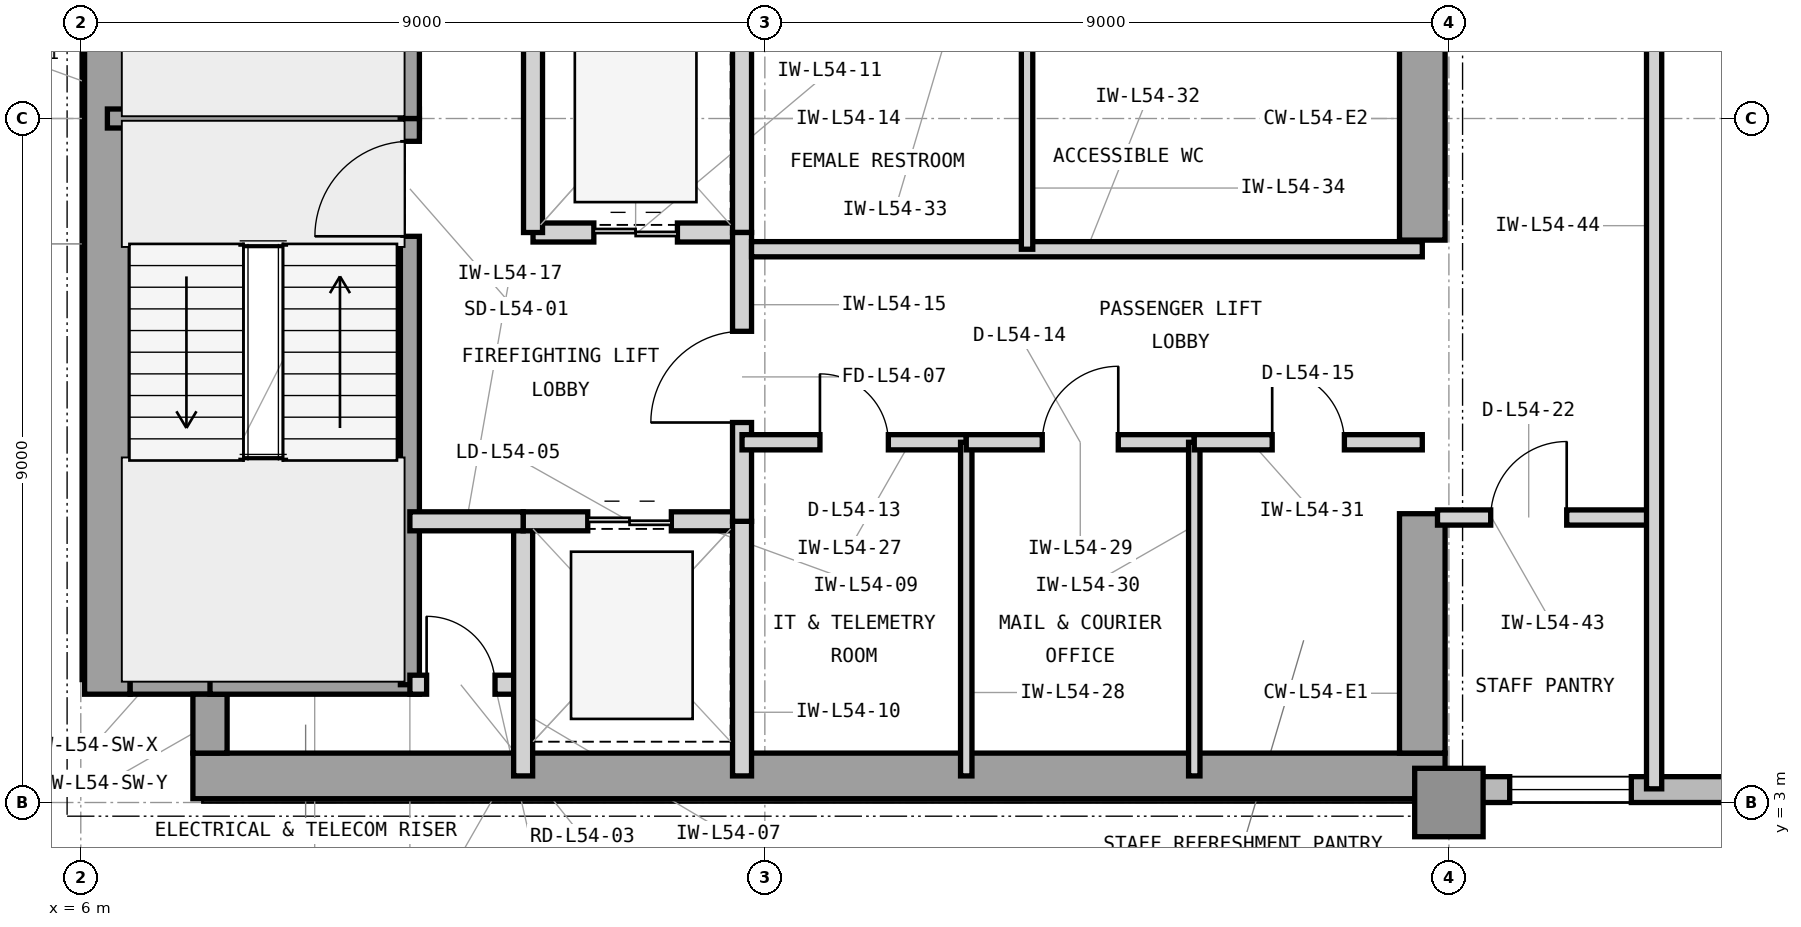
"""IFC4 building model, lengths in metres.
Left out: names, types, materials, properties, quantities, classifications, styles, units other than length and angle.
Written with IfcOpenShell. Run it as: python <this file> out.ifc"""

import sys

from ifc_helpers import new_model, si_unit, direction, frame, frame_2d, origin, origin_2d, place, context, subcontext, project, spatial, rectangle, extrude, element, fill, save


model = new_model("IFC4")
c1 = context("Model", 3, precision=1e-05, world=origin(), true_north=direction((0.0, 1.0)))
c2 = subcontext(c1, "Body", "Model", "MODEL_VIEW")
j1 = project(units=[si_unit("LENGTHUNIT", "METRE"), si_unit("PLANEANGLEUNIT", "RADIAN")], contexts=[c1])
p1 = place(None, origin())
s1 = spatial("IfcSite", under=j1, at=p1, CompositionType="ELEMENT")
p2 = place(p1, origin())
s2 = spatial("IfcBuilding", under=s1, at=p2, CompositionType="ELEMENT")
p3 = place(p2, frame((0.0, 0.0, 222.9)))
s3 = spatial("IfcBuildingStorey", under=s2, at=p3, CompositionType="ELEMENT", Elevation=222.9)
p4 = place(p3, frame((7.475, 3.35, 0.0), z_axis=(0.0, 0.0, 1.0), x_axis=(1.0, 0.0, 0.0)))
e1 = element("IfcWall", 1, at=p4, inside=s3, PredefinedType="SHEAR", context=c2, shape_type="SweptSolid", body=[
    extrude(rectangle(XDim=16.475, YDim=0.6, at=frame_2d((8.237, 0.0))), origin(), (0.0, 0.0, 1.0), 3.9),
])
p5 = place(p3, frame((6.35, 4.425, 0.0), z_axis=(0.0, 0.0, 1.0), x_axis=(0.0, 1.0, 0.0)))
e2 = element("IfcWall", 2, at=p5, inside=s3, PredefinedType="SHEAR", context=c2, shape_type="SweptSolid", body=[
    extrude(rectangle(XDim=15.15, YDim=0.6, at=frame_2d((7.575, 0.0))), origin(), (0.0, 0.0, 1.0), 3.9),
])
p6 = place(p3, frame((23.65, 3.65, 0.0), z_axis=(0.0, 0.0, 1.0), x_axis=(0.0, 1.0, 0.0)))
e3 = element("IfcWall", 3, at=p6, inside=s3, PredefinedType="SHEAR", context=c2, shape_type="SweptSolid", body=[
    extrude(rectangle(XDim=3.15, YDim=0.6, at=frame_2d((1.575, 0.0))), origin(), (0.0, 0.0, 1.0), 3.9),
])
p7 = place(p3, frame((23.65, 10.4, 0.0), z_axis=(0.0, 0.0, 1.0), x_axis=(0.0, 1.0, 0.0)))
e4 = element("IfcWall", 4, at=p7, inside=s3, PredefinedType="SHEAR", context=c2, shape_type="SweptSolid", body=[
    extrude(rectangle(XDim=3.2, YDim=0.6, at=frame_2d((1.6, 0.0))), origin(), (0.0, 0.0, 1.0), 3.9),
])
p8 = place(p3, frame((6.65, 4.65, 0.0), z_axis=(0.0, 0.0, 1.0), x_axis=(1.0, 0.0, 0.0)))
e5 = element("IfcWall", 5, at=p8, inside=s3, PredefinedType="SHEAR", context=c2, shape_type="SweptSolid", body=[
    extrude(rectangle(XDim=1.275, YDim=0.45, at=frame_2d((0.638, 0.0))), origin(), (0.0, 0.0, 1.0), 3.9),
])
p9 = place(p3, frame((7.7, 3.65, 0.0), z_axis=(0.0, 0.0, 1.0), x_axis=(0.0, 1.0, 0.0)))
e6 = element("IfcWall", 6, at=p9, inside=s3, PredefinedType="SHEAR", context=c2, shape_type="SweptSolid", body=[
    extrude(rectangle(XDim=0.775, YDim=0.45, at=frame_2d((0.388, 0.0))), origin(), (0.0, 0.0, 1.0), 3.9),
])
p10 = place(p3, frame((24.0, 3.0, 0.0), z_axis=(0.0, 0.0, 1.0), x_axis=(1.0, 0.0, 0.0)))
e7 = element("IfcColumn", 7, at=p10, inside=s3, PredefinedType="COLUMN", context=c2, shape_type="SweptSolid", body=[
    extrude(rectangle(XDim=0.9, YDim=0.9, at=origin_2d()), origin(), (0.0, 0.0, 1.0), 3.9),
])
p11 = place(p3, frame((23.9, 3.17, 0.0), z_axis=(0.0, 0.0, 1.0), x_axis=(1.0, 0.0, 0.0)))
e8 = element("IfcWall", 8, at=p11, inside=s3, PredefinedType="STANDARD", context=c2, shape_type="SweptSolid", body=[
    extrude(rectangle(XDim=31.5, YDim=0.34, at=frame_2d((15.75, 0.0))), origin(), (0.0, 0.0, 1.0), 3.62),
])
p12 = place(p11, frame((5.6, 0.0, 0.9)))
e9 = element("IfcOpeningElement", 9, at=p12, cuts=e8, PredefinedType="OPENING", context=c2, shape_type="SweptSolid", body=[
    extrude(rectangle(XDim=2.3, YDim=2.2, at=frame_2d((1.15, 1.1))), frame((0.0, 0.18, 0.0), z_axis=(0.0, -1.0, 0.0), x_axis=(1.0, 0.0, 0.0)), (0.0, 0.0, 1.0), 0.36),
])
p13 = place(p11, frame((14.6, 0.0, 0.9)))
e10 = element("IfcOpeningElement", 10, at=p13, cuts=e8, PredefinedType="OPENING", context=c2, shape_type="SweptSolid", body=[
    extrude(rectangle(XDim=2.3, YDim=2.2, at=frame_2d((1.15, 1.1))), frame((0.0, 0.18, 0.0), z_axis=(0.0, -1.0, 0.0), x_axis=(1.0, 0.0, 0.0)), (0.0, 0.0, 1.0), 0.36),
])
p14 = place(p11, frame((0.9, 0.0, 0.9)))
e11 = element("IfcOpeningElement", 11, at=p14, cuts=e8, PredefinedType="OPENING", context=c2, shape_type="SweptSolid", body=[
    extrude(rectangle(XDim=1.6, YDim=2.2, at=frame_2d((0.8, 1.1))), frame((0.0, 0.18, 0.0), z_axis=(0.0, -1.0, 0.0), x_axis=(1.0, 0.0, 0.0)), (0.0, 0.0, 1.0), 0.36),
])
p15 = place(p11, frame((20.825, 0.0, 0.9)))
e12 = element("IfcOpeningElement", 12, at=p15, cuts=e8, PredefinedType="OPENING", context=c2, shape_type="SweptSolid", body=[
    extrude(rectangle(XDim=2.3, YDim=2.2, at=frame_2d((1.15, 1.1))), frame((0.0, 0.18, 0.0), z_axis=(0.0, -1.0, 0.0), x_axis=(1.0, 0.0, 0.0)), (0.0, 0.0, 1.0), 0.36),
])
p16 = place(p3, frame((6.35, 12.0, 0.0), z_axis=(0.0, 0.0, 1.0), x_axis=(1.0, 0.0, 0.0)))
e13 = element("IfcWall", 13, at=p16, inside=s3, PredefinedType="SHEAR", context=c2, shape_type="SweptSolid", body=[
    extrude(rectangle(XDim=4.105, YDim=0.25, at=frame_2d((2.052, 0.0))), origin(), (0.0, 0.0, 1.0), 3.9),
])
p17 = place(p3, frame((7.7, 4.55, 0.0), z_axis=(0.0, 0.0, 1.0), x_axis=(1.0, 0.0, 0.0)))
e14 = element("IfcWall", 14, at=p17, inside=s3, PredefinedType="SHEAR", context=c2, shape_type="SweptSolid", body=[
    extrude(rectangle(XDim=2.755, YDim=0.25, at=frame_2d((1.377, 0.0))), origin(), (0.0, 0.0, 1.0), 3.9),
])
p18 = place(p3, frame((10.33, 4.55, 0.0), z_axis=(0.0, 0.0, 1.0), x_axis=(0.0, 1.0, 0.0)))
e15 = element("IfcWall", 15, at=p18, inside=s3, PredefinedType="SHEAR", context=c2, shape_type="SweptSolid", body=[
    extrude(rectangle(XDim=7.45, YDim=0.25, at=frame_2d((3.725, 0.0))), origin(), (0.0, 0.0, 1.0), 3.9),
])
p19 = place(p18, frame((5.9, 0.0, 0.0)))
e16 = element("IfcOpeningElement", 16, at=p19, cuts=e15, PredefinedType="OPENING", context=c2, shape_type="SweptSolid", body=[
    extrude(rectangle(XDim=1.25, YDim=2.2, at=frame_2d((0.625, 1.1))), frame((0.0, 0.135, 0.0), z_axis=(0.0, -1.0, 0.0), x_axis=(1.0, 0.0, 0.0)), (0.0, 0.0, 1.0), 0.27),
])
p20 = place(p3, frame((10.33, 12.0, 0.0), z_axis=(0.0, 0.0, 1.0), x_axis=(0.0, 1.0, 0.0)))
e17 = element("IfcWall", 17, at=p20, inside=s3, PredefinedType="SHEAR", context=c2, shape_type="SweptSolid", body=[
    extrude(rectangle(XDim=7.45, YDim=0.25, at=frame_2d((3.725, 0.0))), origin(), (0.0, 0.0, 1.0), 3.9),
])
p21 = place(p20, frame((5.85, 0.0, 0.0)))
e18 = element("IfcOpeningElement", 18, at=p21, cuts=e17, PredefinedType="OPENING", context=c2, shape_type="SweptSolid", body=[
    extrude(rectangle(XDim=1.25, YDim=2.2, at=frame_2d((0.625, 1.1))), frame((0.0, 0.135, 0.0), z_axis=(0.0, -1.0, 0.0), x_axis=(1.0, 0.0, 0.0)), (0.0, 0.0, 1.0), 0.27),
])
p22 = place(p3, frame((10.33, 4.55, 0.0), z_axis=(0.0, 0.0, 1.0), x_axis=(1.0, 0.0, 0.0)))
e19 = element("IfcWall", 19, at=p22, inside=s3, PredefinedType="PARTITIONING", context=c2, shape_type="SweptSolid", body=[
    extrude(rectangle(XDim=1.49, YDim=0.25, at=frame_2d((0.745, 0.0))), origin(), (0.0, 0.0, 1.0), 3.61),
])
p23 = place(p22, frame((0.22, 0.0, 0.0)))
e20 = element("IfcOpeningElement", 20, at=p23, cuts=e19, PredefinedType="OPENING", context=c2, shape_type="SweptSolid", body=[
    extrude(rectangle(XDim=0.9, YDim=2.1, at=frame_2d((0.45, 1.05))), frame((0.0, 0.135, 0.0), z_axis=(0.0, -1.0, 0.0), x_axis=(1.0, 0.0, 0.0)), (0.0, 0.0, 1.0), 0.27),
])
p24 = place(p3, frame((11.82, 3.35, 0.0), z_axis=(0.0, 0.0, 1.0), x_axis=(0.0, 1.0, 0.0)))
e21 = element("IfcWall", 21, at=p24, inside=s3, PredefinedType="PARTITIONING", context=c2, shape_type="SweptSolid", body=[
    extrude(rectangle(XDim=3.35, YDim=0.25, at=frame_2d((1.675, 0.0))), origin(), (0.0, 0.0, 1.0), 3.61),
])
p25 = place(p3, frame((11.82, 6.7, 0.0), z_axis=(0.0, 0.0, 1.0), x_axis=(1.0, 0.0, 0.0)))
e22 = element("IfcWall", 22, at=p25, inside=s3, PredefinedType="PARTITIONING", context=c2, shape_type="SweptSolid", body=[
    extrude(rectangle(XDim=2.88, YDim=0.25, at=frame_2d((1.44, 0.0))), origin(), (0.0, 0.0, 1.0), 3.073),
])
p26 = place(p25, frame((0.85, 0.0, 0.0)))
e23 = element("IfcOpeningElement", 23, at=p26, cuts=e22, PredefinedType="OPENING", context=c2, shape_type="SweptSolid", body=[
    extrude(rectangle(XDim=1.1, YDim=2.25, at=frame_2d((0.55, 1.125))), frame((0.0, 0.135, 0.0), z_axis=(0.0, -1.0, 0.0), x_axis=(1.0, 0.0, 0.0)), (0.0, 0.0, 1.0), 0.27),
])
p27 = place(p3, frame((14.7, 3.35, 0.0), z_axis=(0.0, 0.0, 1.0), x_axis=(0.0, 1.0, 0.0)))
e24 = element("IfcWall", 24, at=p27, inside=s3, PredefinedType="PARTITIONING", context=c2, shape_type="SweptSolid", body=[
    extrude(rectangle(XDim=3.35, YDim=0.25, at=frame_2d((1.675, 0.0))), origin(), (0.0, 0.0, 1.0), 3.61),
])
p28 = place(p3, frame((11.95, 10.5, 0.0), z_axis=(0.0, 0.0, 1.0), x_axis=(1.0, 0.0, 0.0)))
e25 = element("IfcWall", 25, at=p28, inside=s3, PredefinedType="PARTITIONING", context=c2, shape_type="SweptSolid", body=[
    extrude(rectangle(XDim=2.75, YDim=0.25, at=frame_2d((1.375, 0.0))), origin(), (0.0, 0.0, 1.0), 3.073),
])
p29 = place(p28, frame((0.8, 0.0, 0.0)))
e26 = element("IfcOpeningElement", 26, at=p29, cuts=e25, PredefinedType="OPENING", context=c2, shape_type="SweptSolid", body=[
    extrude(rectangle(XDim=1.1, YDim=2.25, at=frame_2d((0.55, 1.125))), frame((0.0, 0.135, 0.0), z_axis=(0.0, -1.0, 0.0), x_axis=(1.0, 0.0, 0.0)), (0.0, 0.0, 1.0), 0.27),
])
for number, where, z_axis, x_axis in (
    (27, (11.95, 10.5, 0.0), (0.0, 0.0, 1.0), (0.0, 1.0, 0.0)),
    (28, (14.7, 10.5, 0.0), (0.0, 0.0, 1.0), (0.0, 1.0, 0.0)),
):
    element("IfcWall", number, at=place(p3, frame(where, z_axis=z_axis, x_axis=x_axis)), inside=s3, PredefinedType="PARTITIONING", context=c2, shape_type="SweptSolid", body=[
        extrude(rectangle(XDim=3.0, YDim=0.25, at=frame_2d((1.5, 0.0))), origin(), (0.0, 0.0, 1.0), 3.61),
    ])
p30 = place(p3, frame((14.7, 6.7, 0.0), z_axis=(0.0, 0.0, 1.0), x_axis=(0.0, 1.0, 0.0)))
e29 = element("IfcWall", 29, at=p30, inside=s3, PredefinedType="PARTITIONING", context=c2, shape_type="SweptSolid", body=[
    extrude(rectangle(XDim=3.8, YDim=0.25, at=frame_2d((1.9, 0.0))), origin(), (0.0, 0.0, 1.0), 3.61),
])
p31 = place(p30, frame((1.3, 0.0, 0.0)))
e30 = element("IfcOpeningElement", 30, at=p31, cuts=e29, PredefinedType="OPENING", context=c2, shape_type="SweptSolid", body=[
    extrude(rectangle(XDim=1.2, YDim=2.2, at=frame_2d((0.6, 1.1))), frame((0.0, 0.135, 0.0), z_axis=(0.0, -1.0, 0.0), x_axis=(1.0, 0.0, 0.0)), (0.0, 0.0, 1.0), 0.27),
])
p32 = place(p3, frame((10.33, 6.7, 0.0), z_axis=(0.0, 0.0, 1.0), x_axis=(1.0, 0.0, 0.0)))
e31 = element("IfcWall", 31, at=p32, inside=s3, PredefinedType="PARTITIONING", context=c2, shape_type="SweptSolid", body=[
    extrude(rectangle(XDim=1.49, YDim=0.25, at=frame_2d((0.745, 0.0))), origin(), (0.0, 0.0, 1.0), 3.073),
])
p33 = place(p3, frame((14.7, 7.74, 0.0), z_axis=(0.0, 0.0, 1.0), x_axis=(1.0, 0.0, 0.0)))
e32 = element("IfcWall", 32, at=p33, inside=s3, PredefinedType="PARTITIONING", context=c2, shape_type="SweptSolid", body=[
    extrude(rectangle(XDim=2.95, YDim=0.2, at=frame_2d((1.475, 0.0))), origin(), (0.0, 0.0, 1.0), 3.61),
])
p34 = place(p33, frame((1.025, 0.0, 0.0)))
e33 = element("IfcOpeningElement", 33, at=p34, cuts=e32, PredefinedType="OPENING", context=c2, shape_type="SweptSolid", body=[
    extrude(rectangle(XDim=0.9, YDim=2.1, at=frame_2d((0.45, 1.05))), frame((0.0, 0.11, 0.0), z_axis=(0.0, -1.0, 0.0), x_axis=(1.0, 0.0, 0.0)), (0.0, 0.0, 1.0), 0.22),
])
p35 = place(p3, frame((17.65, 3.35, 0.0), z_axis=(0.0, 0.0, 1.0), x_axis=(0.0, 1.0, 0.0)))
e34 = element("IfcWall", 34, at=p35, inside=s3, PredefinedType="PARTITIONING", context=c2, shape_type="SweptSolid", body=[
    extrude(rectangle(XDim=4.39, YDim=0.15, at=frame_2d((2.195, 0.0))), origin(), (0.0, 0.0, 1.0), 3.61),
])
p36 = place(p3, frame((17.65, 7.74, 0.0), z_axis=(0.0, 0.0, 1.0), x_axis=(1.0, 0.0, 0.0)))
e35 = element("IfcWall", 35, at=p36, inside=s3, PredefinedType="PARTITIONING", context=c2, shape_type="SweptSolid", body=[
    extrude(rectangle(XDim=3.0, YDim=0.2, at=frame_2d((1.5, 0.0))), origin(), (0.0, 0.0, 1.0), 3.61),
])
p37 = place(p36, frame((1.0, 0.0, 0.0)))
e36 = element("IfcOpeningElement", 36, at=p37, cuts=e35, PredefinedType="OPENING", context=c2, shape_type="SweptSolid", body=[
    extrude(rectangle(XDim=1.0, YDim=2.15, at=frame_2d((0.5, 1.075))), frame((0.0, 0.11, 0.0), z_axis=(0.0, -1.0, 0.0), x_axis=(1.0, 0.0, 0.0)), (0.0, 0.0, 1.0), 0.22),
])
p38 = place(p3, frame((20.65, 3.35, 0.0), z_axis=(0.0, 0.0, 1.0), x_axis=(0.0, 1.0, 0.0)))
e37 = element("IfcWall", 37, at=p38, inside=s3, PredefinedType="PARTITIONING", context=c2, shape_type="SweptSolid", body=[
    extrude(rectangle(XDim=4.39, YDim=0.15, at=frame_2d((2.195, 0.0))), origin(), (0.0, 0.0, 1.0), 3.61),
])
p39 = place(p3, frame((20.65, 7.74, 0.0), z_axis=(0.0, 0.0, 1.0), x_axis=(1.0, 0.0, 0.0)))
e38 = element("IfcWall", 38, at=p39, inside=s3, PredefinedType="PARTITIONING", context=c2, shape_type="SweptSolid", body=[
    extrude(rectangle(XDim=3.0, YDim=0.2, at=frame_2d((1.5, 0.0))), origin(), (0.0, 0.0, 1.0), 3.61),
])
p40 = place(p39, frame((1.025, 0.0, 0.0)))
e39 = element("IfcOpeningElement", 39, at=p40, cuts=e38, PredefinedType="OPENING", context=c2, shape_type="SweptSolid", body=[
    extrude(rectangle(XDim=0.95, YDim=2.1, at=frame_2d((0.475, 1.05))), frame((0.0, 0.11, 0.0), z_axis=(0.0, -1.0, 0.0), x_axis=(1.0, 0.0, 0.0)), (0.0, 0.0, 1.0), 0.22),
])
p41 = place(p3, frame((14.825, 10.28, 0.0), z_axis=(0.0, 0.0, 1.0), x_axis=(1.0, 0.0, 0.0)))
e40 = element("IfcWall", 40, at=p41, inside=s3, PredefinedType="PARTITIONING", context=c2, shape_type="SweptSolid", body=[
    extrude(rectangle(XDim=8.825, YDim=0.2, at=frame_2d((4.413, 0.0))), origin(), (0.0, 0.0, 1.0), 3.61),
])
p42 = place(p3, frame((18.45, 10.28, 0.0), z_axis=(0.0, 0.0, 1.0), x_axis=(0.0, 1.0, 0.0)))
e41 = element("IfcWall", 41, at=p42, inside=s3, PredefinedType="PARTITIONING", context=c2, shape_type="SweptSolid", body=[
    extrude(rectangle(XDim=3.22, YDim=0.15, at=frame_2d((1.61, 0.0))), origin(), (0.0, 0.0, 1.0), 3.61),
])
p43 = place(p3, frame((23.85, 6.75, 0.0), z_axis=(0.0, 0.0, 1.0), x_axis=(1.0, 0.0, 0.0)))
e42 = element("IfcWall", 42, at=p43, inside=s3, PredefinedType="PARTITIONING", context=c2, shape_type="SweptSolid", body=[
    extrude(rectangle(XDim=2.85, YDim=0.2, at=frame_2d((1.425, 0.0))), origin(), (0.0, 0.0, 1.0), 3.61),
])
p44 = place(p43, frame((0.7, 0.0, 0.0)))
e43 = element("IfcOpeningElement", 43, at=p44, cuts=e42, PredefinedType="OPENING", context=c2, shape_type="SweptSolid", body=[
    extrude(rectangle(XDim=1.0, YDim=2.15, at=frame_2d((0.5, 1.075))), frame((0.0, 0.11, 0.0), z_axis=(0.0, -1.0, 0.0), x_axis=(1.0, 0.0, 0.0)), (0.0, 0.0, 1.0), 0.22),
])
p45 = place(p3, frame((26.7, 3.18, 0.0), z_axis=(0.0, 0.0, 1.0), x_axis=(0.0, 1.0, 0.0)))
e44 = element("IfcWall", 44, at=p45, inside=s3, PredefinedType="PARTITIONING", context=c2, shape_type="SweptSolid", body=[
    extrude(rectangle(XDim=14.82, YDim=0.2, at=frame_2d((7.41, 0.0))), origin(), (0.0, 0.0, 1.0), 3.61),
])
p46 = place(p19, origin())
e45 = element("IfcDoor", 45, at=p46, inside=s3, OperationType="SINGLE_SWING_LEFT", PredefinedType="DOOR", context=c2, shape_type="SweptSolid", body=[
    extrude(rectangle(XDim=1.25, YDim=2.2, at=frame_2d((0.625, 1.1))), frame((0.0, 0.025, 0.0), z_axis=(0.0, -1.0, 0.0), x_axis=(1.0, 0.0, 0.0)), (0.0, 0.0, 1.0), 0.05),
])
fill(e16, e45)
p47 = place(p23, origin())
e46 = element("IfcDoor", 46, at=p47, inside=s3, OperationType="SINGLE_SWING_LEFT", PredefinedType="TRAPDOOR", context=c2, shape_type="SweptSolid", body=[
    extrude(rectangle(XDim=0.9, YDim=2.1, at=frame_2d((0.45, 1.05))), frame((0.0, 0.025, 0.0), z_axis=(0.0, -1.0, 0.0), x_axis=(1.0, 0.0, 0.0)), (0.0, 0.0, 1.0), 0.05),
])
fill(e20, e46)
p48 = place(p26, origin())
e47 = element("IfcDoor", 47, at=p48, inside=s3, OperationType="DOUBLE_DOOR_SLIDING", PredefinedType="DOOR", context=c2, shape_type="SweptSolid", body=[
    extrude(rectangle(XDim=1.1, YDim=2.25, at=frame_2d((0.55, 1.125))), frame((0.0, 0.025, 0.0), z_axis=(0.0, -1.0, 0.0), x_axis=(1.0, 0.0, 0.0)), (0.0, 0.0, 1.0), 0.05),
])
fill(e23, e47)
p49 = place(p29, origin())
e48 = element("IfcDoor", 48, at=p49, inside=s3, OperationType="DOUBLE_DOOR_SLIDING", PredefinedType="DOOR", context=c2, shape_type="SweptSolid", body=[
    extrude(rectangle(XDim=1.1, YDim=2.25, at=frame_2d((0.55, 1.125))), frame((0.0, 0.025, 0.0), z_axis=(0.0, -1.0, 0.0), x_axis=(1.0, 0.0, 0.0)), (0.0, 0.0, 1.0), 0.05),
])
fill(e26, e48)
p50 = place(p31, origin())
e49 = element("IfcDoor", 49, at=p50, inside=s3, OperationType="SINGLE_SWING_LEFT", PredefinedType="DOOR", context=c2, shape_type="SweptSolid", body=[
    extrude(rectangle(XDim=1.2, YDim=2.2, at=frame_2d((0.6, 1.1))), frame((0.0, 0.025, 0.0), z_axis=(0.0, -1.0, 0.0), x_axis=(1.0, 0.0, 0.0)), (0.0, 0.0, 1.0), 0.05),
])
fill(e30, e49)
p51 = place(p34, origin())
e50 = element("IfcDoor", 50, at=p51, inside=s3, OperationType="SINGLE_SWING_LEFT", PredefinedType="TRAPDOOR", context=c2, shape_type="SweptSolid", body=[
    extrude(rectangle(XDim=0.9, YDim=2.1, at=frame_2d((0.45, 1.05))), frame((0.0, 0.025, 0.0), z_axis=(0.0, -1.0, 0.0), x_axis=(1.0, 0.0, 0.0)), (0.0, 0.0, 1.0), 0.05),
])
fill(e33, e50)
p52 = place(p37, origin())
e51 = element("IfcDoor", 51, at=p52, inside=s3, OperationType="SINGLE_SWING_RIGHT", PredefinedType="DOOR", context=c2, shape_type="SweptSolid", body=[
    extrude(rectangle(XDim=1.0, YDim=2.15, at=frame_2d((0.5, 1.075))), frame((0.0, 0.025, 0.0), z_axis=(0.0, -1.0, 0.0), x_axis=(1.0, 0.0, 0.0)), (0.0, 0.0, 1.0), 0.05),
])
fill(e36, e51)
p53 = place(p40, origin())
e52 = element("IfcDoor", 52, at=p53, inside=s3, OperationType="SINGLE_SWING_LEFT", PredefinedType="DOOR", context=c2, shape_type="SweptSolid", body=[
    extrude(rectangle(XDim=0.95, YDim=2.1, at=frame_2d((0.475, 1.05))), frame((0.0, 0.025, 0.0), z_axis=(0.0, -1.0, 0.0), x_axis=(1.0, 0.0, 0.0)), (0.0, 0.0, 1.0), 0.05),
])
fill(e39, e52)
p54 = place(p44, origin())
e53 = element("IfcDoor", 53, at=p54, inside=s3, OperationType="SINGLE_SWING_RIGHT", PredefinedType="DOOR", context=c2, shape_type="SweptSolid", body=[
    extrude(rectangle(XDim=1.0, YDim=2.15, at=frame_2d((0.5, 1.075))), frame((0.0, 0.025, 0.0), z_axis=(0.0, -1.0, 0.0), x_axis=(1.0, 0.0, 0.0)), (0.0, 0.0, 1.0), 0.05),
])
fill(e43, e53)
p55 = place(p14, origin())
e54 = element("IfcWindow", 54, at=p55, inside=s3, PartitioningType="SINGLE_PANEL", PredefinedType="WINDOW", context=c2, shape_type="SweptSolid", body=[
    extrude(rectangle(XDim=1.6, YDim=2.2, at=frame_2d((0.8, 1.1))), frame((0.0, 0.11, 0.0), z_axis=(0.0, -1.0, 0.0), x_axis=(1.0, 0.0, 0.0)), (0.0, 0.0, 1.0), 0.06),
])
fill(e11, e54)
save(model, sys.argv[1])
